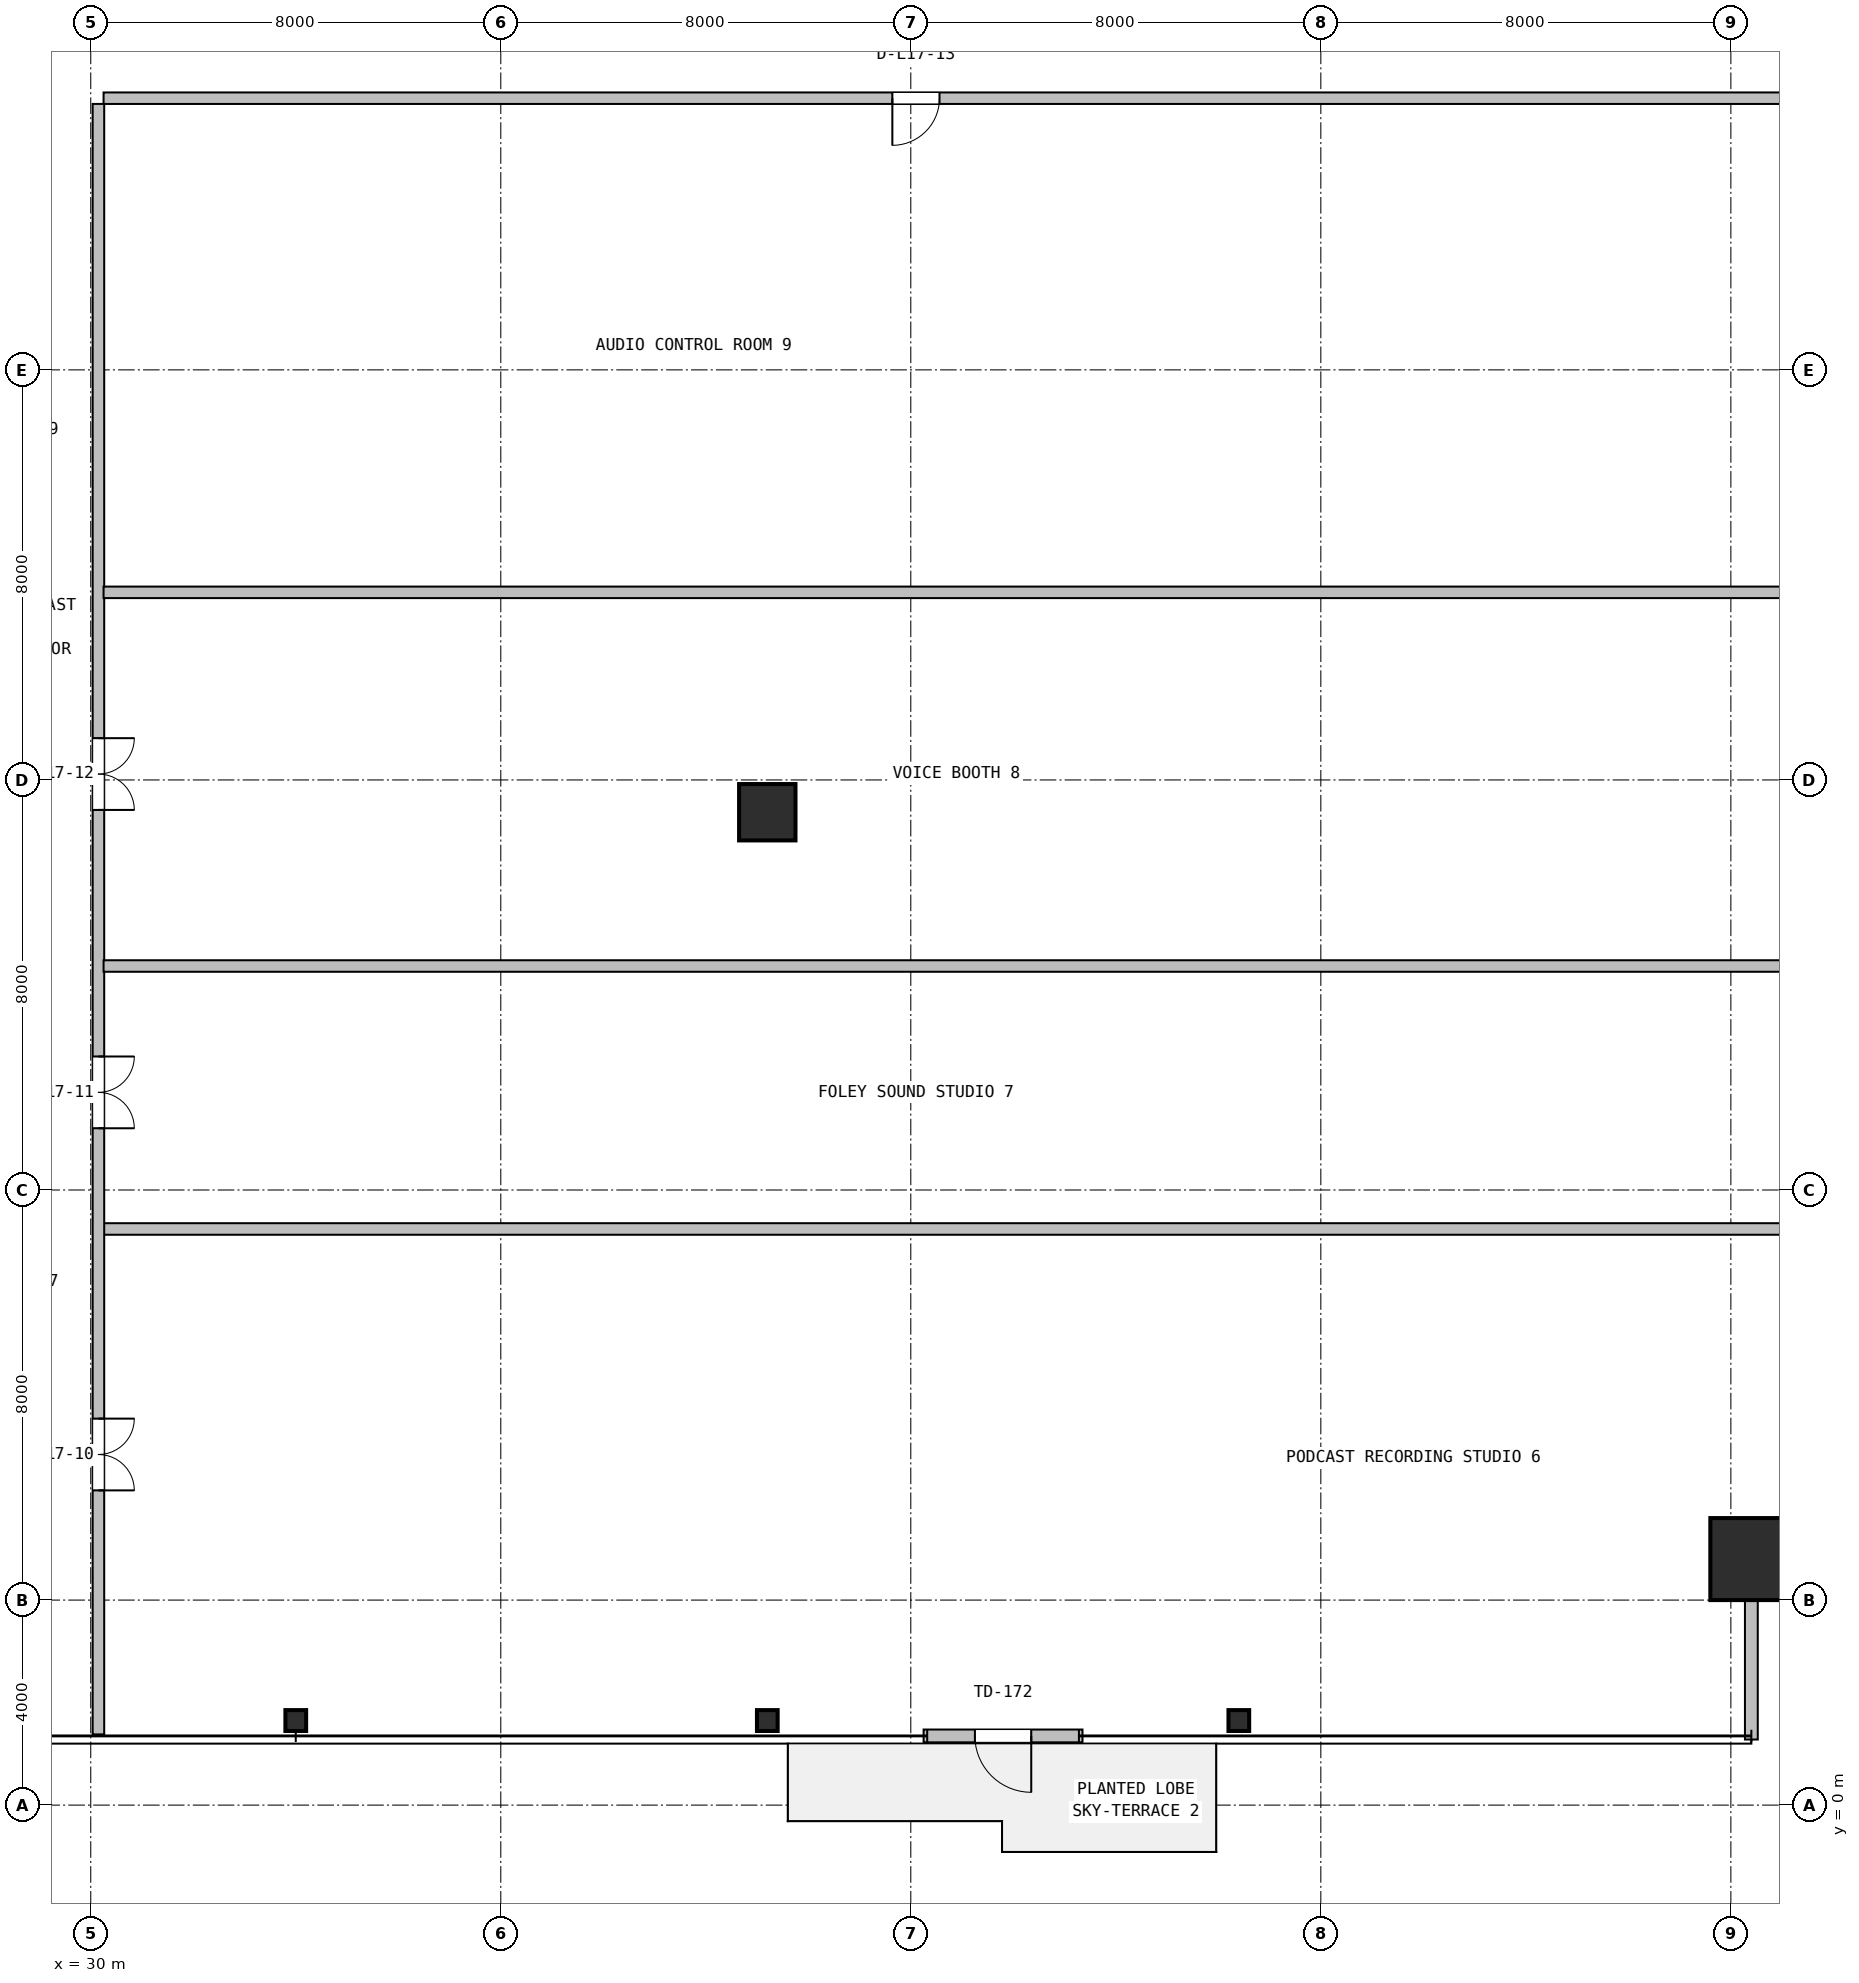
"""IFC4 building model, lengths in metres.
Left out: names, types, materials, properties, quantities, classifications, styles, units other than length and angle.
Written with IfcOpenShell. Run it as: python <this file> out.ifc"""

import sys

from ifc_helpers import new_model, si_unit, direction, frame, frame_2d, origin, origin_2d, place, context, subcontext, project, spatial, rectangle, hollow_rectangle, i_section, extrude, source, transform, mapped, element, fill, save


model = new_model("IFC4")
c1 = context("Model", 3, precision=1e-05, world=origin(), true_north=direction((0.0, 1.0)))
c2 = subcontext(c1, "Body", "Model", "MODEL_VIEW")
j1 = project(units=[si_unit("LENGTHUNIT", "METRE"), si_unit("PLANEANGLEUNIT", "RADIAN")], contexts=[c1])
p1 = place(None, origin())
s1 = spatial("IfcSite", under=j1, at=p1, CompositionType="ELEMENT")
p2 = place(p1, origin())
s2 = spatial("IfcBuilding", under=s1, at=p2, CompositionType="ELEMENT")
p3 = place(p2, frame((0.0, 0.0, 74.4)))
s3 = spatial("IfcBuildingStorey", under=s2, at=p3, CompositionType="ELEMENT", Elevation=74.4)
m1 = source(origin(), c2, "Body", "SweptSolid", [
    extrude(hollow_rectangle(XDim=1.6, YDim=1.6, WallThickness=0.06, at=origin_2d()), origin(), (0.0, 0.0, 1.0), 3.9),
])
p4 = place(p3, frame((62.4, 4.8, 0.0), z_axis=(0.0, 0.0, 1.0), x_axis=(1.0, 0.0, 0.0)))
e1 = element("IfcColumn", 1, at=p4, inside=s3, PredefinedType="COLUMN", context=c2, shape_type="MappedRepresentation", body=[
    mapped(m1, transform((0.0, 0.0, 0.0), x_axis=(1.0, 0.0, 0.0), y_axis=(0.0, 1.0, 0.0), z_axis=(0.0, 0.0, 1.0), scale=1.0)),
])
m2 = source(origin(), c2, "Body", "SweptSolid", [
    extrude(i_section(OverallWidth=0.404, OverallDepth=0.407, WebThickness=0.027, FlangeThickness=0.044, FilletRadius=0.018, at=origin_2d()), origin(), (0.0, 0.0, 1.0), 3.9),
])
for number, where, z_axis, x_axis in (
    (2, (34.0, 1.65, 0.0), (0.0, 0.0, 1.0), (1.0, 0.0, 0.0)),
    (3, (43.2, 1.65, 0.0), (0.0, 0.0, 1.0), (1.0, 0.0, 0.0)),
    (4, (52.4, 1.65, 0.0), (0.0, 0.0, 1.0), (1.0, 0.0, 0.0)),
):
    element("IfcColumn", number, at=place(p3, frame(where, z_axis=z_axis, x_axis=x_axis)), inside=s3, PredefinedType="COLUMN", context=c2, shape_type="MappedRepresentation", body=[
        mapped(m2, transform((0.0, 0.0, 0.0), x_axis=(1.0, 0.0, 0.0), y_axis=(0.0, 1.0, 0.0), z_axis=(0.0, 0.0, 1.0), scale=1.0)),
    ])
m3 = source(origin(), c2, "Body", "SweptSolid", [
    extrude(rectangle(XDim=1.1, YDim=1.1, at=origin_2d()), origin(), (0.0, 0.0, 1.0), 3.9),
])
p5 = place(p3, frame((43.2, 19.37, 0.0), z_axis=(0.0, 0.0, 1.0), x_axis=(1.0, 0.0, 0.0)))
e5 = element("IfcColumn", 5, at=p5, inside=s3, PredefinedType="COLUMN", context=c2, shape_type="MappedRepresentation", body=[
    mapped(m3, transform((0.0, 0.0, 0.0), x_axis=(1.0, 0.0, 0.0), y_axis=(0.0, 1.0, 0.0), z_axis=(0.0, 0.0, 1.0), scale=1.0)),
])
p6 = place(p3, frame((46.25, 1.35, 0.0), z_axis=(0.0, 0.0, 1.0), x_axis=(1.0, 0.0, 0.0)))
e6 = element("IfcWall", 6, at=p6, inside=s3, PredefinedType="SOLIDWALL", context=c2, shape_type="SweptSolid", body=[
    extrude(rectangle(XDim=3.1, YDim=0.25, at=frame_2d((1.55, 0.0))), origin(), (0.0, 0.0, 1.0), 3.63),
])
p7 = place(p6, frame((1.0, 0.0, 0.0)))
e7 = element("IfcOpeningElement", 7, at=p7, cuts=e6, PredefinedType="OPENING", context=c2, shape_type="SweptSolid", body=[
    extrude(rectangle(XDim=1.1, YDim=2.15, at=frame_2d((0.55, 1.075))), frame((0.0, 0.135, 0.0), z_axis=(0.0, -1.0, 0.0), x_axis=(1.0, 0.0, 0.0)), (0.0, 0.0, 1.0), 0.27),
])
p8 = place(p3, frame((62.4, 1.28, 0.0), z_axis=(0.0, 0.0, 1.0), x_axis=(0.0, 1.0, 0.0)))
e8 = element("IfcWall", 8, at=p8, inside=s3, PredefinedType="SOLIDWALL", context=c2, shape_type="SweptSolid", body=[
    extrude(rectangle(XDim=3.6, YDim=0.25, at=frame_2d((1.8, 0.0))), origin(), (0.0, 0.0, 1.0), 3.208),
])
p9 = place(p3, frame((30.25, 11.24, 0.0), z_axis=(0.0, 0.0, 1.0), x_axis=(1.0, 0.0, 0.0)))
e9 = element("IfcWall", 9, at=p9, inside=s3, PredefinedType="PARTITIONING", context=c2, shape_type="SweptSolid", body=[
    extrude(rectangle(XDim=35.57, YDim=0.225, at=frame_2d((17.785, 0.0))), origin(), (0.0, 0.0, 1.0), 2.852),
])
p10 = place(p3, frame((30.15, 1.38, 0.0), z_axis=(0.0, 0.0, 1.0), x_axis=(0.0, 1.0, 0.0)))
e10 = element("IfcWall", 10, at=p10, inside=s3, PredefinedType="PARTITIONING", context=c2, shape_type="SweptSolid", body=[
    extrude(rectangle(XDim=31.808, YDim=0.225, at=frame_2d((15.904, 0.0))), origin(), (0.0, 0.0, 1.0), 2.852),
])
p11 = place(p10, frame((4.76, 0.0, 0.0)))
e11 = element("IfcOpeningElement", 11, at=p11, cuts=e10, PredefinedType="OPENING", context=c2, shape_type="SweptSolid", body=[
    extrude(rectangle(XDim=1.4, YDim=2.12, at=frame_2d((0.7, 1.06))), frame((0.0, 0.123, 0.0), z_axis=(0.0, -1.0, 0.0), x_axis=(1.0, 0.0, 0.0)), (0.0, 0.0, 1.0), 0.245),
])
p12 = place(p10, frame((11.825, 0.0, 0.0)))
e12 = element("IfcOpeningElement", 12, at=p12, cuts=e10, PredefinedType="OPENING", context=c2, shape_type="SweptSolid", body=[
    extrude(rectangle(XDim=1.4, YDim=2.12, at=frame_2d((0.7, 1.06))), frame((0.0, 0.123, 0.0), z_axis=(0.0, -1.0, 0.0), x_axis=(1.0, 0.0, 0.0)), (0.0, 0.0, 1.0), 0.245),
])
p13 = place(p10, frame((18.035, 0.0, 0.0)))
e13 = element("IfcOpeningElement", 13, at=p13, cuts=e10, PredefinedType="OPENING", context=c2, shape_type="SweptSolid", body=[
    extrude(rectangle(XDim=1.4, YDim=2.12, at=frame_2d((0.7, 1.06))), frame((0.0, 0.123, 0.0), z_axis=(0.0, -1.0, 0.0), x_axis=(1.0, 0.0, 0.0)), (0.0, 0.0, 1.0), 0.245),
])
for number, where, z_axis, x_axis in (
    (14, (30.25, 16.37, 0.0), (0.0, 0.0, 1.0), (1.0, 0.0, 0.0)),
    (15, (30.25, 23.66, 0.0), (0.0, 0.0, 1.0), (1.0, 0.0, 0.0)),
):
    element("IfcWall", number, at=place(p3, frame(where, z_axis=z_axis, x_axis=x_axis)), inside=s3, PredefinedType="PARTITIONING", context=c2, shape_type="SweptSolid", body=[
        extrude(rectangle(XDim=35.57, YDim=0.225, at=frame_2d((17.785, 0.0))), origin(), (0.0, 0.0, 1.0), 2.852),
    ])
p14 = place(p3, frame((30.25, 33.3, 0.0), z_axis=(0.0, 0.0, 1.0), x_axis=(1.0, 0.0, 0.0)))
e16 = element("IfcWall", 16, at=p14, inside=s3, PredefinedType="PARTITIONING", context=c2, shape_type="SweptSolid", body=[
    extrude(rectangle(XDim=35.57, YDim=0.225, at=frame_2d((17.785, 0.0))), origin(), (0.0, 0.0, 1.0), 2.852),
])
p15 = place(p14, frame((15.39, 0.0, 0.0)))
e17 = element("IfcOpeningElement", 17, at=p15, cuts=e16, PredefinedType="OPENING", context=c2, shape_type="SweptSolid", body=[
    extrude(rectangle(XDim=0.92, YDim=2.08, at=frame_2d((0.46, 1.04))), frame((0.0, 0.123, 0.0), z_axis=(0.0, -1.0, 0.0), x_axis=(1.0, 0.0, 0.0)), (0.0, 0.0, 1.0), 0.245),
])
m4 = source(origin(), c2, "Body", "SweptSolid", [
    extrude(rectangle(XDim=1.1, YDim=2.15, at=frame_2d((0.55, 1.075))), frame((0.0, 0.025, 0.0), z_axis=(0.0, -1.0, 0.0), x_axis=(1.0, 0.0, 0.0)), (0.0, 0.0, 1.0), 0.05),
])
p16 = place(p7, frame((1.1, 0.0, 0.0), z_axis=(0.0, 0.0, 1.0), x_axis=(-1.0, 0.0, 0.0)))
e18 = element("IfcDoor", 18, at=p16, inside=s3, OperationType="SINGLE_SWING_RIGHT", PredefinedType="DOOR", context=c2, shape_type="MappedRepresentation", body=[
    mapped(m4, transform((0.0, 0.0, 0.0), x_axis=(1.0, 0.0, 0.0), y_axis=(0.0, 1.0, 0.0), z_axis=(0.0, 0.0, 1.0), scale=1.0)),
])
fill(e7, e18)
m5 = source(origin(), c2, "Body", "SweptSolid", [
    extrude(rectangle(XDim=1.4, YDim=2.12, at=frame_2d((0.7, 1.06))), frame((0.0, 0.025, 0.0), z_axis=(0.0, -1.0, 0.0), x_axis=(1.0, 0.0, 0.0)), (0.0, 0.0, 1.0), 0.05),
])
p17 = place(p11, frame((1.4, 0.0, 0.0), z_axis=(0.0, 0.0, 1.0), x_axis=(-1.0, 0.0, 0.0)))
e19 = element("IfcDoor", 19, at=p17, inside=s3, OperationType="DOUBLE_DOOR_SINGLE_SWING", PredefinedType="DOOR", context=c2, shape_type="MappedRepresentation", body=[
    mapped(m5, transform((0.0, 0.0, 0.0), x_axis=(1.0, 0.0, 0.0), y_axis=(0.0, 1.0, 0.0), z_axis=(0.0, 0.0, 1.0), scale=1.0)),
])
fill(e11, e19)
p18 = place(p12, frame((1.4, 0.0, 0.0), z_axis=(0.0, 0.0, 1.0), x_axis=(-1.0, 0.0, 0.0)))
e20 = element("IfcDoor", 20, at=p18, inside=s3, OperationType="DOUBLE_DOOR_SINGLE_SWING", PredefinedType="DOOR", context=c2, shape_type="MappedRepresentation", body=[
    mapped(m5, transform((0.0, 0.0, 0.0), x_axis=(1.0, 0.0, 0.0), y_axis=(0.0, 1.0, 0.0), z_axis=(0.0, 0.0, 1.0), scale=1.0)),
])
fill(e12, e20)
p19 = place(p13, frame((1.4, 0.0, 0.0), z_axis=(0.0, 0.0, 1.0), x_axis=(-1.0, 0.0, 0.0)))
e21 = element("IfcDoor", 21, at=p19, inside=s3, OperationType="DOUBLE_DOOR_SINGLE_SWING", PredefinedType="DOOR", context=c2, shape_type="MappedRepresentation", body=[
    mapped(m5, transform((0.0, 0.0, 0.0), x_axis=(1.0, 0.0, 0.0), y_axis=(0.0, 1.0, 0.0), z_axis=(0.0, 0.0, 1.0), scale=1.0)),
])
fill(e13, e21)
m6 = source(origin(), c2, "Body", "SweptSolid", [
    extrude(rectangle(XDim=0.92, YDim=2.08, at=frame_2d((0.46, 1.04))), frame((0.0, 0.025, 0.0), z_axis=(0.0, -1.0, 0.0), x_axis=(1.0, 0.0, 0.0)), (0.0, 0.0, 1.0), 0.05),
])
p20 = place(p15, frame((0.92, 0.0, 0.0), z_axis=(0.0, 0.0, 1.0), x_axis=(-1.0, 0.0, 0.0)))
e22 = element("IfcDoor", 22, at=p20, inside=s3, OperationType="SINGLE_SWING_LEFT", PredefinedType="DOOR", context=c2, shape_type="MappedRepresentation", body=[
    mapped(m6, transform((0.0, 0.0, 0.0), x_axis=(1.0, 0.0, 0.0), y_axis=(0.0, 1.0, 0.0), z_axis=(0.0, 0.0, 1.0), scale=1.0)),
])
fill(e17, e22)
save(model, sys.argv[1])
